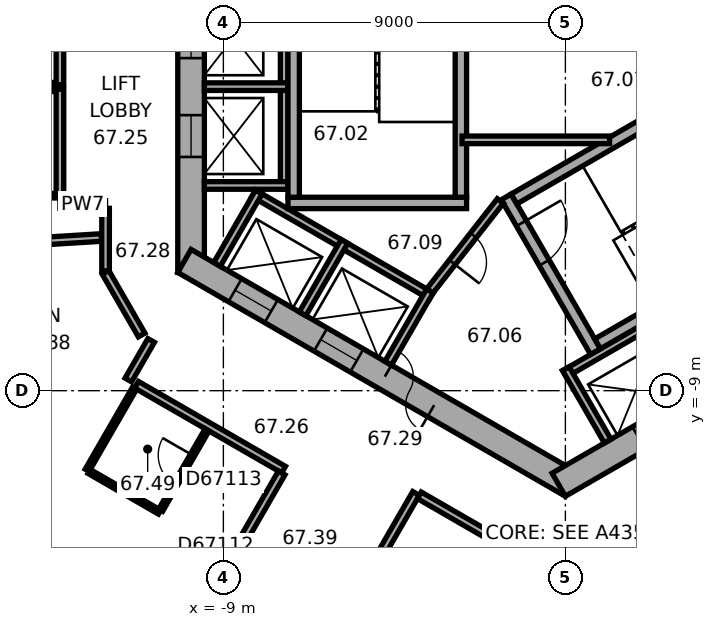
"""IFC4 building model, lengths in metres.
Left out: names, types, materials, properties, quantities, classifications, styles, units other than length and angle.
Written with IfcOpenShell. Run it as: python <this file> out.ifc"""

import sys

from ifc_helpers import new_model, si_unit, direction, frame, frame_2d, origin, place, context, subcontext, project, spatial, rectangle, extrude, element, fill, save


model = new_model("IFC4")
c1 = context("Model", 3, precision=1e-05, world=origin(), true_north=direction((0.0, 1.0)))
c2 = subcontext(c1, "Body", "Model", "MODEL_VIEW")
j1 = project(units=[si_unit("LENGTHUNIT", "METRE"), si_unit("PLANEANGLEUNIT", "RADIAN")], contexts=[c1])
p1 = place(None, origin())
s1 = spatial("IfcSite", under=j1, at=p1, CompositionType="ELEMENT")
p2 = place(p1, origin())
s2 = spatial("IfcBuilding", under=s1, at=p2, CompositionType="ELEMENT")
p3 = place(p2, frame((0.0, 0.0, 270.9)))
s3 = spatial("IfcBuildingStorey", under=s2, at=p3, CompositionType="ELEMENT", Elevation=270.9)
p4 = place(p3, frame((-9.85, 5.889, 0.0), z_axis=(0.0, 0.0, 1.0), x_axis=(0.0, -1.0, 0.0)))
e1 = element("IfcWall", 1, at=p4, inside=s3, PredefinedType="SHEAR", context=c2, shape_type="SweptSolid", body=[
    extrude(rectangle(XDim=11.778, YDim=0.7, at=frame_2d((5.889, 0.0))), origin(), (0.0, 0.0, 1.0), 3.7),
])
p5 = place(p4, frame((5.039, 0.0, 0.0)))
e2 = element("IfcOpeningElement", 2, at=p5, cuts=e1, PredefinedType="OPENING", context=c2, shape_type="SweptSolid", body=[
    extrude(rectangle(XDim=1.1, YDim=2.1, at=frame_2d((0.55, 1.05))), frame((0.0, 0.36, 0.0), z_axis=(0.0, -1.0, 0.0), x_axis=(1.0, 0.0, 0.0)), (0.0, 0.0, 1.0), 0.72),
])
p6 = place(p4, frame((7.639, 0.0, 0.0)))
e3 = element("IfcOpeningElement", 3, at=p6, cuts=e1, PredefinedType="OPENING", context=c2, shape_type="SweptSolid", body=[
    extrude(rectangle(XDim=1.1, YDim=2.1, at=frame_2d((0.55, 1.05))), frame((0.0, 0.36, 0.0), z_axis=(0.0, -1.0, 0.0), x_axis=(1.0, 0.0, 0.0)), (0.0, 0.0, 1.0), 0.72),
])
p7 = place(p3, frame((-10.025, -5.586, 0.0), z_axis=(0.0, 0.0, 1.0), x_axis=(0.866026453023, -0.499998182661, 0.0)))
e4 = element("IfcWall", 4, at=p7, inside=s3, PredefinedType="SHEAR", context=c2, shape_type="SweptSolid", body=[
    extrude(rectangle(XDim=11.778, YDim=0.7, at=frame_2d((5.889, 0.0))), origin(), (0.0, 0.0, 1.0), 3.7),
])
p8 = place(p7, frame((6.089, 0.0, 0.0)))
e5 = element("IfcOpeningElement", 5, at=p8, cuts=e4, PredefinedType="OPENING", context=c2, shape_type="SweptSolid", body=[
    extrude(rectangle(XDim=1.5, YDim=2.1, at=frame_2d((0.75, 1.05))), frame((0.0, 0.36, 0.0), z_axis=(0.0, -1.0, 0.0), x_axis=(1.0, 0.0, 0.0)), (0.0, 0.0, 1.0), 0.72),
])
p9 = place(p7, frame((1.539, 0.0, 0.0)))
e6 = element("IfcOpeningElement", 6, at=p9, cuts=e4, PredefinedType="OPENING", context=c2, shape_type="SweptSolid", body=[
    extrude(rectangle(XDim=1.1, YDim=2.1, at=frame_2d((0.55, 1.05))), frame((0.0, 0.36, 0.0), z_axis=(0.0, -1.0, 0.0), x_axis=(1.0, 0.0, 0.0)), (0.0, 0.0, 1.0), 0.72),
])
p10 = place(p7, frame((4.139, 0.0, 0.0)))
e7 = element("IfcOpeningElement", 7, at=p10, cuts=e4, PredefinedType="OPENING", context=c2, shape_type="SweptSolid", body=[
    extrude(rectangle(XDim=1.1, YDim=2.1, at=frame_2d((0.55, 1.05))), frame((0.0, 0.36, 0.0), z_axis=(0.0, -1.0, 0.0), x_axis=(1.0, 0.0, 0.0)), (0.0, 0.0, 1.0), 0.72),
])
p11 = place(p3, frame((-0.175, -11.475, 0.0), z_axis=(0.0, 0.0, 1.0), x_axis=(0.866026453023, 0.499998182661, 0.0)))
e8 = element("IfcWall", 8, at=p11, inside=s3, PredefinedType="SHEAR", context=c2, shape_type="SweptSolid", body=[
    extrude(rectangle(XDim=11.778, YDim=0.7, at=frame_2d((5.889, 0.0))), origin(), (0.0, 0.0, 1.0), 3.7),
])
p12 = place(p11, frame((2.439, 0.0, 0.0)))
e9 = element("IfcOpeningElement", 9, at=p12, cuts=e8, PredefinedType="OPENING", context=c2, shape_type="SweptSolid", body=[
    extrude(rectangle(XDim=1.1, YDim=2.1, at=frame_2d((0.55, 1.05))), frame((0.0, 0.36, 0.0), z_axis=(0.0, -1.0, 0.0), x_axis=(1.0, 0.0, 0.0)), (0.0, 0.0, 1.0), 0.72),
])
p13 = place(p11, frame((5.039, 0.0, 0.0)))
e10 = element("IfcOpeningElement", 10, at=p13, cuts=e8, PredefinedType="OPENING", context=c2, shape_type="SweptSolid", body=[
    extrude(rectangle(XDim=1.1, YDim=2.1, at=frame_2d((0.55, 1.05))), frame((0.0, 0.36, 0.0), z_axis=(0.0, -1.0, 0.0), x_axis=(1.0, 0.0, 0.0)), (0.0, 0.0, 1.0), 0.72),
])
p14 = place(p11, frame((7.639, 0.0, 0.0)))
e11 = element("IfcOpeningElement", 11, at=p14, cuts=e8, PredefinedType="OPENING", context=c2, shape_type="SweptSolid", body=[
    extrude(rectangle(XDim=1.1, YDim=2.1, at=frame_2d((0.55, 1.05))), frame((0.0, 0.36, 0.0), z_axis=(0.0, -1.0, 0.0), x_axis=(1.0, 0.0, 0.0)), (0.0, 0.0, 1.0), 0.72),
])
p15 = place(p3, frame((-16.626, -12.629, 0.0), z_axis=(0.0, 0.0, 1.0), x_axis=(0.866026460444, -0.499998169808, 0.0)))
e12 = element("IfcWall", 12, at=p15, inside=s3, PredefinedType="STANDARD", context=c2, shape_type="SweptSolid", body=[
    extrude(rectangle(XDim=17.731, YDim=0.2, at=frame_2d((8.866, 0.0))), origin(), (0.0, 0.0, 1.0), 3.7),
])
p16 = place(p15, frame((1.203, 0.0, 0.9)))
e13 = element("IfcOpeningElement", 13, at=p16, cuts=e12, PredefinedType="OPENING", context=c2, shape_type="SweptSolid", body=[
    extrude(rectangle(XDim=2.0, YDim=2.0, at=frame_2d((1.0, 1.0))), frame((0.0, 0.11, 0.0), z_axis=(0.0, -1.0, 0.0), x_axis=(1.0, 0.0, 0.0)), (0.0, 0.0, 1.0), 0.22),
])
p17 = place(p15, frame((4.535, 0.0, 0.9)))
e14 = element("IfcOpeningElement", 14, at=p17, cuts=e12, PredefinedType="OPENING", context=c2, shape_type="SweptSolid", body=[
    extrude(rectangle(XDim=2.0, YDim=2.0, at=frame_2d((1.0, 1.0))), frame((0.0, 0.11, 0.0), z_axis=(0.0, -1.0, 0.0), x_axis=(1.0, 0.0, 0.0)), (0.0, 0.0, 1.0), 0.22),
])
p18 = place(p15, frame((7.867, 0.0, 0.9)))
e15 = element("IfcOpeningElement", 15, at=p18, cuts=e12, PredefinedType="OPENING", context=c2, shape_type="SweptSolid", body=[
    extrude(rectangle(XDim=2.0, YDim=2.0, at=frame_2d((1.0, 1.0))), frame((0.0, 0.11, 0.0), z_axis=(0.0, -1.0, 0.0), x_axis=(1.0, 0.0, 0.0)), (0.0, 0.0, 1.0), 0.22),
])
p19 = place(p15, frame((11.198, 0.0, 0.9)))
e16 = element("IfcOpeningElement", 16, at=p19, cuts=e12, PredefinedType="OPENING", context=c2, shape_type="SweptSolid", body=[
    extrude(rectangle(XDim=2.0, YDim=2.0, at=frame_2d((1.0, 1.0))), frame((0.0, 0.11, 0.0), z_axis=(0.0, -1.0, 0.0), x_axis=(1.0, 0.0, 0.0)), (0.0, 0.0, 1.0), 0.22),
])
p20 = place(p15, frame((14.53, 0.0, 0.9)))
e17 = element("IfcOpeningElement", 17, at=p20, cuts=e12, PredefinedType="OPENING", context=c2, shape_type="SweptSolid", body=[
    extrude(rectangle(XDim=2.0, YDim=2.0, at=frame_2d((1.0, 1.0))), frame((0.0, 0.11, 0.0), z_axis=(0.0, -1.0, 0.0), x_axis=(1.0, 0.0, 0.0)), (0.0, 0.0, 1.0), 0.22),
])
p21 = place(p3, frame((-7.4, 4.3, 0.0), z_axis=(0.0, 0.0, 1.0), x_axis=(0.0, -1.0, 0.0)))
e18 = element("IfcWall", 18, at=p21, inside=s3, PredefinedType="PARTITIONING", context=c2, shape_type="SweptSolid", body=[
    extrude(rectangle(XDim=8.0, YDim=0.2, at=frame_2d((4.0, 0.0))), origin(), (0.0, 0.0, 1.0), 3.42),
])
for number, where, z_axis, x_axis in (
    (19, (-7.3, -1.0, 0.0), (0.0, 0.0, 1.0), (-1.0, 0.0, 0.0)),
    (20, (-7.3, -3.6, 0.0), (0.0, 0.0, 1.0), (-1.0, 0.0, 0.0)),
):
    element("IfcWall", number, at=place(p3, frame(where, z_axis=z_axis, x_axis=x_axis)), inside=s3, PredefinedType="PARTITIONING", context=c2, shape_type="SweptSolid", body=[
        extrude(rectangle(XDim=2.2, YDim=0.2, at=frame_2d((1.1, 0.0))), origin(), (0.0, 0.0, 1.0), 3.42),
    ])
p22 = place(p3, frame((-8.203, -3.809, 0.0), z_axis=(0.0, 0.0, 1.0), x_axis=(0.866028230842, -0.499995103361, 0.0)))
e21 = element("IfcWall", 21, at=p22, inside=s3, PredefinedType="PARTITIONING", context=c2, shape_type="SweptSolid", body=[
    extrude(rectangle(XDim=5.4, YDim=0.2, at=frame_2d((2.7, 0.0))), origin(), (0.0, 0.0, 1.0), 3.42),
])
for number, where, z_axis, x_axis in (
    (22, (-8.067, -3.772, 0.0), (0.0, 0.0, 1.0), (-0.5, -0.866, 0.0)),
    (23, (-5.815, -5.072, 0.0), (0.0, 0.0, 1.0), (-0.5, -0.866, 0.0)),
):
    element("IfcWall", number, at=place(p3, frame(where, z_axis=z_axis, x_axis=x_axis)), inside=s3, PredefinedType="PARTITIONING", context=c2, shape_type="SweptSolid", body=[
        extrude(rectangle(XDim=2.2, YDim=0.2, at=frame_2d((1.1, 0.0))), origin(), (0.0, 0.0, 1.0), 3.42),
    ])
p23 = place(p3, frame((-3.563, -6.372, 0.0), z_axis=(0.0, 0.0, 1.0), x_axis=(-0.499994660107, -0.866028486751, 0.0)))
e24 = element("IfcWall", 24, at=p23, inside=s3, PredefinedType="PARTITIONING", context=c2, shape_type="SweptSolid", body=[
    extrude(rectangle(XDim=2.2, YDim=0.2, at=frame_2d((1.1, 0.0))), origin(), (0.0, 0.0, 1.0), 3.42),
])
p24 = place(p3, frame((-0.024, -8.559, 0.0), z_axis=(0.0, 0.0, 1.0), x_axis=(0.866026010844, 0.49999894854, 0.0)))
e25 = element("IfcWall", 25, at=p24, inside=s3, PredefinedType="PARTITIONING", context=c2, shape_type="SweptSolid", body=[
    extrude(rectangle(XDim=8.0, YDim=0.2, at=frame_2d((4.0, 0.0))), origin(), (0.0, 0.0, 1.0), 3.42),
])
p25 = place(p3, frame((0.013, -8.422, 0.0), z_axis=(0.0, 0.0, 1.0), x_axis=(0.500077893725, -0.86598042715, 0.0)))
e26 = element("IfcWall", 26, at=p25, inside=s3, PredefinedType="PARTITIONING", context=c2, shape_type="SweptSolid", body=[
    extrude(rectangle(XDim=2.2, YDim=0.2, at=frame_2d((1.1, 0.0))), origin(), (0.0, 0.0, 1.0), 3.42),
])
p26 = place(p3, frame((-2.6, -4.06, 0.0), z_axis=(0.0, 0.0, 1.0), x_axis=(-1.0, 0.0, 0.0)))
e27 = element("IfcWall", 27, at=p26, inside=s3, PredefinedType="SHEAR", context=c2, shape_type="SweptSolid", body=[
    extrude(rectangle(XDim=4.7, YDim=0.3, at=frame_2d((2.35, 0.0))), origin(), (0.0, 0.0, 1.0), 3.42),
])
for number, where, z_axis, x_axis in (
    (28, (-2.75, 3.15, 0.0), (0.0, 0.0, 1.0), (0.0, -1.0, 0.0)),
    (29, (-7.15, 3.15, 0.0), (0.0, 0.0, 1.0), (0.0, -1.0, 0.0)),
):
    element("IfcWall", number, at=place(p3, frame(where, z_axis=z_axis, x_axis=x_axis)), inside=s3, PredefinedType="SHEAR", context=c2, shape_type="SweptSolid", body=[
        extrude(rectangle(XDim=7.06, YDim=0.3, at=frame_2d((3.53, 0.0))), origin(), (0.0, 0.0, 1.0), 3.42),
    ])
p27 = place(p3, frame((-1.558, -3.902, 0.0), z_axis=(0.0, 0.0, 1.0), x_axis=(0.499977259774, -0.866038532462, 0.0)))
e30 = element("IfcWall", 30, at=p27, inside=s3, PredefinedType="SHEAR", context=c2, shape_type="SweptSolid", body=[
    extrude(rectangle(XDim=4.7, YDim=0.3, at=frame_2d((2.35, 0.0))), origin(), (0.0, 0.0, 1.0), 3.42),
])
p28 = place(p27, frame((0.8, 0.0, 0.0)))
e31 = element("IfcOpeningElement", 31, at=p28, cuts=e30, PredefinedType="OPENING", context=c2, shape_type="SweptSolid", body=[
    extrude(rectangle(XDim=1.2, YDim=2.1, at=frame_2d((0.6, 1.05))), frame((0.0, 0.16, 0.0), z_axis=(0.0, -1.0, 0.0), x_axis=(1.0, 0.0, 0.0)), (0.0, 0.0, 1.0), 0.32),
])
for number, where, z_axis, x_axis in (
    (32, (-1.353, -3.957, 0.0), (0.0, 0.0, 1.0), (0.866, 0.5, 0.0)),
    (33, (0.847, -7.767, 0.0), (0.0, 0.0, 1.0), (0.866, 0.5, 0.0)),
):
    element("IfcWall", number, at=place(p3, frame(where, z_axis=z_axis, x_axis=x_axis)), inside=s3, PredefinedType="SHEAR", context=c2, shape_type="SweptSolid", body=[
        extrude(rectangle(XDim=7.06, YDim=0.3, at=frame_2d((3.53, 0.0))), origin(), (0.0, 0.0, 1.0), 3.42),
    ])
p29 = place(p3, frame((-1.712, -4.008, 0.0), z_axis=(0.0, 0.0, 1.0), x_axis=(-0.616549420702, -0.787316208287, 0.0)))
e34 = element("IfcWall", 34, at=p29, inside=s3, PredefinedType="PARTITIONING", context=c2, shape_type="SweptSolid", body=[
    extrude(rectangle(XDim=3.002, YDim=0.2, at=frame_2d((1.501, 0.0))), origin(), (0.0, 0.0, 1.0), 3.42),
])
p30 = place(p29, frame((1.15, 0.0, 0.0)))
e35 = element("IfcOpeningElement", 35, at=p30, cuts=e34, PredefinedType="OPENING", context=c2, shape_type="SweptSolid", body=[
    extrude(rectangle(XDim=0.9, YDim=2.1, at=frame_2d((0.45, 1.05))), frame((0.0, 0.11, 0.0), z_axis=(0.0, -1.0, 0.0), x_axis=(1.0, 0.0, 0.0)), (0.0, 0.0, 1.0), 0.22),
])
p31 = place(p3, frame((-2.72, -2.4, 0.0), z_axis=(0.0, 0.0, 1.0), x_axis=(1.0, 0.0, 0.0)))
e36 = element("IfcWall", 36, at=p31, inside=s3, PredefinedType="PARTITIONING", context=c2, shape_type="SweptSolid", body=[
    extrude(rectangle(XDim=3.883, YDim=0.2, at=frame_2d((1.941, 0.0))), origin(), (0.0, 0.0, 1.0), 3.42),
])
p32 = place(p3, frame((-18.158, -5.333, 0.0), z_axis=(0.0, 0.0, 1.0), x_axis=(0.998135365626, 0.061039265125, 0.0)))
e37 = element("IfcWall", 37, at=p32, inside=s3, PredefinedType="PARTITIONING", context=c2, shape_type="SweptSolid", body=[
    extrude(rectangle(XDim=5.96, YDim=0.2, at=frame_2d((2.98, 0.0))), origin(), (0.0, 0.0, 1.0), 2.87),
])
for number, where, z_axis, x_axis in (
    (38, (-16.441, -1.069, 0.0), (0.0, 0.0, 1.0), (1.0, 0.0, 0.0)),
    (39, (-13.401, -3.869, 0.0), (0.0, 0.0, 1.0), (-1.0, 0.0, 0.0)),
    (40, (-13.401, -0.949, 0.0), (0.0, 0.0, 1.0), (-1.0, 0.0, 0.0)),
):
    element("IfcWall", number, at=place(p3, frame(where, z_axis=z_axis, x_axis=x_axis)), inside=s3, PredefinedType="PARTITIONING", context=c2, shape_type="SweptSolid", body=[
        extrude(rectangle(XDim=3.04, YDim=0.12, at=frame_2d((1.52, 0.0))), origin(), (0.0, 0.0, 1.0), 3.42),
    ])
p33 = place(p3, frame((-13.301, -4.101, 0.0), z_axis=(0.0, 0.0, 1.0), x_axis=(1.0, 0.0, 0.0)))
e41 = element("IfcWall", 41, at=p33, inside=s3, PredefinedType="PARTITIONING", context=c2, shape_type="SweptSolid", body=[
    extrude(rectangle(XDim=1.201, YDim=0.2, at=frame_2d((0.601, 0.0))), origin(), (0.0, 0.0, 1.0), 3.42),
])
p34 = place(p3, frame((-13.301, -1.069, 0.0), z_axis=(0.0, 0.0, 1.0), x_axis=(0.0, -1.0, 0.0)))
e42 = element("IfcWall", 42, at=p34, inside=s3, PredefinedType="PARTITIONING", context=c2, shape_type="SweptSolid", body=[
    extrude(rectangle(XDim=2.8, YDim=0.2, at=frame_2d((1.4, 0.0))), origin(), (0.0, 0.0, 1.0), 3.42),
])
p35 = place(p3, frame((-13.301, 1.851, 0.0), z_axis=(0.0, 0.0, 1.0), x_axis=(0.0, -1.0, 0.0)))
e43 = element("IfcWall", 43, at=p35, inside=s3, PredefinedType="PARTITIONING", context=c2, shape_type="SweptSolid", body=[
    extrude(rectangle(XDim=2.8, YDim=0.2, at=frame_2d((1.4, 0.0))), origin(), (0.0, 0.0, 1.0), 3.42),
])
p36 = place(p3, frame((-12.585, -11.095, 0.0), z_axis=(0.0, 0.0, 1.0), x_axis=(0.500004234368, 0.866022959057, 0.0)))
e44 = element("IfcWall", 44, at=p36, inside=s3, PredefinedType="PARTITIONING", context=c2, shape_type="SweptSolid", body=[
    extrude(rectangle(XDim=2.5, YDim=0.12, at=frame_2d((1.25, 0.0))), origin(), (0.0, 0.0, 1.0), 3.42),
])
p37 = place(p3, frame((-12.1, -5.889, 0.0), z_axis=(0.0, 0.0, 1.0), x_axis=(0.500063520245, -0.865988727248, 0.0)))
e45 = element("IfcWall", 45, at=p37, inside=s3, PredefinedType="PARTITIONING", context=c2, shape_type="SweptSolid", body=[
    extrude(rectangle(XDim=1.9, YDim=0.2, at=frame_2d((0.95, 0.0))), origin(), (0.0, 0.0, 1.0), 3.42),
])
p38 = place(p3, frame((-12.1, -4.201, 0.0), z_axis=(0.0, 0.0, 1.0), x_axis=(0.0, -1.0, 0.0)))
e46 = element("IfcWall", 46, at=p38, inside=s3, PredefinedType="PARTITIONING", context=c2, shape_type="SweptSolid", body=[
    extrude(rectangle(XDim=1.648, YDim=0.2, at=frame_2d((0.824, 0.0))), origin(), (0.0, 0.0, 1.0), 3.42),
])
p39 = place(p3, frame((-11.285, -8.844, 0.0), z_axis=(0.0, 0.0, 1.0), x_axis=(0.866021785011, -0.500006267848, 0.0)))
e47 = element("IfcWall", 47, at=p39, inside=s3, PredefinedType="PARTITIONING", context=c2, shape_type="SweptSolid", body=[
    extrude(rectangle(XDim=4.468, YDim=0.2, at=frame_2d((2.234, 0.0))), origin(), (0.0, 0.0, 1.0), 3.42),
])
p40 = place(p3, frame((-10.901, -7.678, 0.0), z_axis=(0.0, 0.0, 1.0), x_axis=(-0.500074377092, -0.865982457891, 0.0)))
e48 = element("IfcWall", 48, at=p40, inside=s3, PredefinedType="PARTITIONING", context=c2, shape_type="SweptSolid", body=[
    extrude(rectangle(XDim=1.201, YDim=0.2, at=frame_2d((0.601, 0.0))), origin(), (0.0, 0.0, 1.0), 3.42),
])
p41 = place(p3, frame((-10.679, -12.195, 0.0), z_axis=(0.0, 0.0, 1.0), x_axis=(-0.866037418504, 0.499979189318, 0.0)))
e49 = element("IfcWall", 49, at=p41, inside=s3, PredefinedType="PARTITIONING", context=c2, shape_type="SweptSolid", body=[
    extrude(rectangle(XDim=2.14, YDim=0.12, at=frame_2d((1.07, 0.0))), origin(), (0.0, 0.0, 1.0), 3.42),
])
p42 = place(p3, frame((-9.99, -15.537, 0.0), z_axis=(0.0, 0.0, 1.0), x_axis=(0.499966611936, 0.866044679534, 0.0)))
e50 = element("IfcWall", 50, at=p42, inside=s3, PredefinedType="PARTITIONING", context=c2, shape_type="SweptSolid", body=[
    extrude(rectangle(XDim=5.049, YDim=0.2, at=frame_2d((2.524, 0.0))), origin(), (0.0, 0.0, 1.0), 2.87),
])
p43 = place(p42, frame((2.024, 0.0, 0.0)))
e51 = element("IfcOpeningElement", 51, at=p43, cuts=e50, PredefinedType="OPENING", context=c2, shape_type="SweptSolid", body=[
    extrude(rectangle(XDim=1.0, YDim=2.1, at=frame_2d((0.5, 1.05))), frame((0.0, 0.11, 0.0), z_axis=(0.0, -1.0, 0.0), x_axis=(1.0, 0.0, 0.0)), (0.0, 0.0, 1.0), 0.22),
])
p44 = place(p3, frame((-9.429, -10.03, 0.0), z_axis=(0.0, 0.0, 1.0), x_axis=(-0.500034220881, -0.866005645448, 0.0)))
e52 = element("IfcWall", 52, at=p44, inside=s3, PredefinedType="PARTITIONING", context=c2, shape_type="SweptSolid", body=[
    extrude(rectangle(XDim=2.44, YDim=0.12, at=frame_2d((1.22, 0.0))), origin(), (0.0, 0.0, 1.0), 3.42),
])
p45 = place(p44, frame((0.77, 0.0, 0.0)))
e53 = element("IfcOpeningElement", 53, at=p45, cuts=e52, PredefinedType="OPENING", context=c2, shape_type="SweptSolid", body=[
    extrude(rectangle(XDim=0.9, YDim=2.1, at=frame_2d((0.45, 1.05))), frame((0.0, 0.07, 0.0), z_axis=(0.0, -1.0, 0.0), x_axis=(1.0, 0.0, 0.0)), (0.0, 0.0, 1.0), 0.14),
])
p46 = place(p3, frame((-7.105, -17.202, 0.0), z_axis=(0.0, 0.0, 1.0), x_axis=(0.499988692146, 0.866031932279, 0.0)))
e54 = element("IfcWall", 54, at=p46, inside=s3, PredefinedType="PARTITIONING", context=c2, shape_type="SweptSolid", body=[
    extrude(rectangle(XDim=6.35, YDim=0.2, at=frame_2d((3.175, 0.0))), origin(), (0.0, 0.0, 1.0), 3.42),
])
p47 = place(p46, frame((2.675, 0.0, 0.0)))
e55 = element("IfcOpeningElement", 55, at=p47, cuts=e54, PredefinedType="OPENING", context=c2, shape_type="SweptSolid", body=[
    extrude(rectangle(XDim=1.0, YDim=2.1, at=frame_2d((0.5, 1.05))), frame((0.0, 0.11, 0.0), z_axis=(0.0, -1.0, 0.0), x_axis=(1.0, 0.0, 0.0)), (0.0, 0.0, 1.0), 0.22),
])
p48 = place(p3, frame((-3.843, -11.753, 0.0), z_axis=(0.0, 0.0, 1.0), x_axis=(0.866031037473, -0.499990242038, 0.0)))
e56 = element("IfcWall", 56, at=p48, inside=s3, PredefinedType="PARTITIONING", context=c2, shape_type="SweptSolid", body=[
    extrude(rectangle(XDim=3.341, YDim=0.2, at=frame_2d((1.67, 0.0))), origin(), (0.0, 0.0, 1.0), 3.42),
])
p49 = place(p3, frame((0.985, -13.403, 0.0), z_axis=(0.0, 0.0, 1.0), x_axis=(0.866032814021, 0.499987164874, 0.0)))
e57 = element("IfcWall", 57, at=p49, inside=s3, PredefinedType="PARTITIONING", context=c2, shape_type="SweptSolid", body=[
    extrude(rectangle(XDim=0.798, YDim=0.2, at=frame_2d((0.399, 0.0))), origin(), (0.0, 0.0, 1.0), 3.42),
])
p50 = place(p3, frame((5.364, -18.575, 0.0), z_axis=(0.0, 0.0, 1.0), x_axis=(-0.55195757761, 0.833872191957, 0.0)))
e58 = element("IfcWall", 58, at=p50, inside=s3, PredefinedType="PARTITIONING", context=c2, shape_type="SweptSolid", body=[
    extrude(rectangle(XDim=6.581, YDim=0.2, at=frame_2d((3.291, 0.0))), origin(), (0.0, 0.0, 1.0), 3.42),
])
p51 = place(p8, origin())
e59 = element("IfcDoor", 59, at=p51, inside=s3, OperationType="DOUBLE_DOOR_SINGLE_SWING", PredefinedType="DOOR", context=c2, shape_type="SweptSolid", body=[
    extrude(rectangle(XDim=1.5, YDim=2.1, at=frame_2d((0.75, 1.05))), frame((0.0, 0.025, 0.0), z_axis=(0.0, -1.0, 0.0), x_axis=(1.0, 0.0, 0.0)), (0.0, 0.0, 1.0), 0.05),
])
fill(e5, e59)
p52 = place(p28, origin())
e60 = element("IfcDoor", 60, at=p52, inside=s3, OperationType="SINGLE_SWING_RIGHT", PredefinedType="DOOR", context=c2, shape_type="SweptSolid", body=[
    extrude(rectangle(XDim=1.2, YDim=2.1, at=frame_2d((0.6, 1.05))), frame((0.0, 0.025, 0.0), z_axis=(0.0, -1.0, 0.0), x_axis=(1.0, 0.0, 0.0)), (0.0, 0.0, 1.0), 0.05),
])
fill(e31, e60)
p53 = place(p30, origin())
e61 = element("IfcDoor", 61, at=p53, inside=s3, OperationType="SINGLE_SWING_LEFT", PredefinedType="DOOR", context=c2, shape_type="SweptSolid", body=[
    extrude(rectangle(XDim=0.9, YDim=2.1, at=frame_2d((0.45, 1.05))), frame((0.0, 0.025, 0.0), z_axis=(0.0, -1.0, 0.0), x_axis=(1.0, 0.0, 0.0)), (0.0, 0.0, 1.0), 0.05),
])
fill(e35, e61)
p54 = place(p5, origin())
e62 = element("IfcDoor", 62, at=p54, inside=s3, OperationType="DOUBLE_DOOR_SLIDING", PredefinedType="DOOR", context=c2, shape_type="SweptSolid", body=[
    extrude(rectangle(XDim=1.1, YDim=2.1, at=frame_2d((0.55, 1.05))), frame((0.0, 0.025, 0.0), z_axis=(0.0, -1.0, 0.0), x_axis=(1.0, 0.0, 0.0)), (0.0, 0.0, 1.0), 0.05),
])
fill(e2, e62)
p55 = place(p6, origin())
e63 = element("IfcDoor", 63, at=p55, inside=s3, OperationType="DOUBLE_DOOR_SLIDING", PredefinedType="DOOR", context=c2, shape_type="SweptSolid", body=[
    extrude(rectangle(XDim=1.1, YDim=2.1, at=frame_2d((0.55, 1.05))), frame((0.0, 0.025, 0.0), z_axis=(0.0, -1.0, 0.0), x_axis=(1.0, 0.0, 0.0)), (0.0, 0.0, 1.0), 0.05),
])
fill(e3, e63)
p56 = place(p9, origin())
e64 = element("IfcDoor", 64, at=p56, inside=s3, OperationType="DOUBLE_DOOR_SLIDING", PredefinedType="DOOR", context=c2, shape_type="SweptSolid", body=[
    extrude(rectangle(XDim=1.1, YDim=2.1, at=frame_2d((0.55, 1.05))), frame((0.0, 0.025, 0.0), z_axis=(0.0, -1.0, 0.0), x_axis=(1.0, 0.0, 0.0)), (0.0, 0.0, 1.0), 0.05),
])
fill(e6, e64)
p57 = place(p10, origin())
e65 = element("IfcDoor", 65, at=p57, inside=s3, OperationType="DOUBLE_DOOR_SLIDING", PredefinedType="DOOR", context=c2, shape_type="SweptSolid", body=[
    extrude(rectangle(XDim=1.1, YDim=2.1, at=frame_2d((0.55, 1.05))), frame((0.0, 0.025, 0.0), z_axis=(0.0, -1.0, 0.0), x_axis=(1.0, 0.0, 0.0)), (0.0, 0.0, 1.0), 0.05),
])
fill(e7, e65)
p58 = place(p43, origin())
e66 = element("IfcDoor", 66, at=p58, inside=s3, OperationType="SINGLE_SWING_LEFT", PredefinedType="DOOR", context=c2, shape_type="SweptSolid", body=[
    extrude(rectangle(XDim=1.0, YDim=2.1, at=frame_2d((0.5, 1.05))), frame((0.0, 0.025, 0.0), z_axis=(0.0, -1.0, 0.0), x_axis=(1.0, 0.0, 0.0)), (0.0, 0.0, 1.0), 0.05),
])
fill(e51, e66)
p59 = place(p45, origin())
e67 = element("IfcDoor", 67, at=p59, inside=s3, OperationType="SINGLE_SWING_LEFT", PredefinedType="DOOR", context=c2, shape_type="SweptSolid", body=[
    extrude(rectangle(XDim=0.9, YDim=2.1, at=frame_2d((0.45, 1.05))), frame((0.0, 0.025, 0.0), z_axis=(0.0, -1.0, 0.0), x_axis=(1.0, 0.0, 0.0)), (0.0, 0.0, 1.0), 0.05),
])
fill(e53, e67)
save(model, sys.argv[1])
